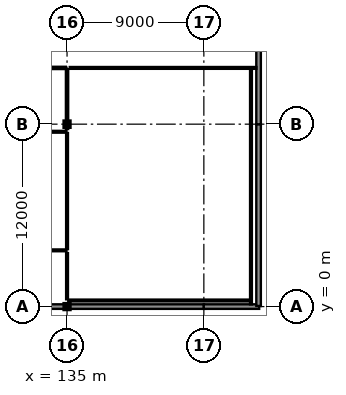
"""IFC4 building model, lengths in metres.
Left out: names, types, materials, properties, quantities, classifications, styles, units other than length and angle.
Written with IfcOpenShell. Run it as: python <this file> out.ifc"""

import sys

from ifc_helpers import new_model, si_unit, direction, frame, frame_2d, origin, origin_2d, place, context, subcontext, project, spatial, rectangle, i_section, extrude, element, fill, save


model = new_model("IFC4")
c1 = context("Model", 3, precision=1e-05, world=origin(), true_north=direction((0.0, 1.0)))
c2 = subcontext(c1, "Body", "Model", "MODEL_VIEW")
j1 = project(units=[si_unit("LENGTHUNIT", "METRE"), si_unit("PLANEANGLEUNIT", "RADIAN")], contexts=[c1])
p1 = place(None, origin())
s1 = spatial("IfcSite", under=j1, at=p1, CompositionType="ELEMENT")
p2 = place(p1, origin())
s2 = spatial("IfcBuilding", under=s1, at=p2, CompositionType="ELEMENT")
p3 = place(p2, frame((0.0, 0.0, 14.4)))
s3 = spatial("IfcBuildingStorey", under=s2, at=p3, CompositionType="ELEMENT", Elevation=14.4)
p4 = place(p3, frame((135.0, 0.0, 0.0), z_axis=(0.0, 0.0, 1.0), x_axis=(0.0, 1.0, 0.0)))
e1 = element("IfcColumn", 1, at=p4, inside=s3, PredefinedType="COLUMN", context=c2, shape_type="SweptSolid", body=[
    extrude(i_section(OverallWidth=0.3, OverallDepth=0.3, WebThickness=0.011, FlangeThickness=0.019, at=origin_2d()), origin(), (0.0, 0.0, 1.0), 4.5),
])
p5 = place(p3, frame((135.0, 12.0, 0.0), z_axis=(0.0, 0.0, 1.0), x_axis=(1.0, 0.0, 0.0)))
e2 = element("IfcColumn", 2, at=p5, inside=s3, PredefinedType="COLUMN", context=c2, shape_type="SweptSolid", body=[
    extrude(i_section(OverallWidth=0.3, OverallDepth=0.32, WebThickness=0.011, FlangeThickness=0.021, at=origin_2d()), origin(), (0.0, 0.0, 1.0), 4.5),
])
p6 = place(p3, frame((126.008, 0.0, 0.0), z_axis=(0.0, 0.0, 1.0), x_axis=(1.0, 0.0, 0.0)))
e3 = element("IfcWall", 3, at=p6, inside=s3, PredefinedType="SOLIDWALL", context=c2, shape_type="SweptSolid", body=[
    extrude(rectangle(XDim=8.844, YDim=0.3, at=frame_2d((4.422, 0.0))), origin(), (0.0, 0.0, 1.0), 3.167),
])
p7 = place(p6, frame((2.003, 0.0, 0.9)))
e4 = element("IfcOpeningElement", 4, at=p7, cuts=e3, PredefinedType="OPENING", context=c2, shape_type="SweptSolid", body=[
    extrude(rectangle(XDim=1.3, YDim=1.3, at=frame_2d((0.65, 0.65))), frame((0.0, 0.165, 0.0), z_axis=(0.0, -1.0, 0.0), x_axis=(1.0, 0.0, 0.0)), (0.0, 0.0, 1.0), 0.33),
])
p8 = place(p6, frame((5.541, 0.0, 0.9)))
e5 = element("IfcOpeningElement", 5, at=p8, cuts=e3, PredefinedType="OPENING", context=c2, shape_type="SweptSolid", body=[
    extrude(rectangle(XDim=1.3, YDim=1.3, at=frame_2d((0.65, 0.65))), frame((0.0, 0.165, 0.0), z_axis=(0.0, -1.0, 0.0), x_axis=(1.0, 0.0, 0.0)), (0.0, 0.0, 1.0), 0.33),
])
p9 = place(p3, frame((135.148, 0.0, 0.0), z_axis=(0.0, 0.0, 1.0), x_axis=(1.0, 0.0, 0.0)))
e6 = element("IfcWall", 6, at=p9, inside=s3, PredefinedType="SOLIDWALL", context=c2, shape_type="SweptSolid", body=[
    extrude(rectangle(XDim=8.862, YDim=0.3, at=frame_2d((4.431, 0.0))), origin(), (0.0, 0.0, 1.0), 3.167),
])
p10 = place(p3, frame((143.99, 0.0, 0.0), z_axis=(0.0, 0.0, 1.0), x_axis=(1.0, 0.0, 0.0)))
e7 = element("IfcWall", 7, at=p10, inside=s3, PredefinedType="SOLIDWALL", context=c2, shape_type="SweptSolid", body=[
    extrude(rectangle(XDim=3.65, YDim=0.3, at=frame_2d((1.825, 0.0))), origin(), (0.0, 0.0, 1.0), 3.167),
])
p11 = place(p3, frame((147.6, 0.04, 0.0), z_axis=(0.0, 0.0, 1.0), x_axis=(0.0, 1.0, 0.0)))
e8 = element("IfcWall", 8, at=p11, inside=s3, PredefinedType="SOLIDWALL", context=c2, shape_type="SweptSolid", body=[
    extrude(rectangle(XDim=11.97, YDim=0.3, at=frame_2d((5.985, 0.0))), origin(), (0.0, 0.0, 1.0), 3.475),
])
p12 = place(p11, frame((2.352, 0.0, 0.85)))
e9 = element("IfcOpeningElement", 9, at=p12, cuts=e8, PredefinedType="OPENING", context=c2, shape_type="SweptSolid", body=[
    extrude(rectangle(XDim=2.0, YDim=2.0, at=frame_2d((1.0, 1.0))), frame((0.0, 0.165, 0.0), z_axis=(0.0, -1.0, 0.0), x_axis=(1.0, 0.0, 0.0)), (0.0, 0.0, 1.0), 0.33),
])
p13 = place(p11, frame((7.618, 0.0, 0.85)))
e10 = element("IfcOpeningElement", 10, at=p13, cuts=e8, PredefinedType="OPENING", context=c2, shape_type="SweptSolid", body=[
    extrude(rectangle(XDim=2.0, YDim=2.0, at=frame_2d((1.0, 1.0))), frame((0.0, 0.165, 0.0), z_axis=(0.0, -1.0, 0.0), x_axis=(1.0, 0.0, 0.0)), (0.0, 0.0, 1.0), 0.33),
])
p14 = place(p3, frame((147.6, 11.99, 0.0), z_axis=(0.0, 0.0, 1.0), x_axis=(0.0, 1.0, 0.0)))
e11 = element("IfcWall", 11, at=p14, inside=s3, PredefinedType="SOLIDWALL", context=c2, shape_type="SweptSolid", body=[
    extrude(rectangle(XDim=12.05, YDim=0.3, at=frame_2d((6.025, 0.0))), origin(), (0.0, 0.0, 1.0), 3.475),
])
p15 = place(p14, frame((1.47, 0.0, 0.85)))
e12 = element("IfcOpeningElement", 12, at=p15, cuts=e11, PredefinedType="OPENING", context=c2, shape_type="SweptSolid", body=[
    extrude(rectangle(XDim=2.0, YDim=2.0, at=frame_2d((1.0, 1.0))), frame((0.0, 0.165, 0.0), z_axis=(0.0, -1.0, 0.0), x_axis=(1.0, 0.0, 0.0)), (0.0, 0.0, 1.0), 0.33),
])
p16 = place(p14, frame((7.676, 0.0, 0.85)))
e13 = element("IfcOpeningElement", 13, at=p16, cuts=e11, PredefinedType="OPENING", context=c2, shape_type="SweptSolid", body=[
    extrude(rectangle(XDim=2.0, YDim=2.0, at=frame_2d((1.0, 1.0))), frame((0.0, 0.165, 0.0), z_axis=(0.0, -1.0, 0.0), x_axis=(1.0, 0.0, 0.0)), (0.0, 0.0, 1.0), 0.33),
])
p17 = place(p3, frame((130.18, 11.5, 0.0), z_axis=(0.0, 0.0, 1.0), x_axis=(1.0, 0.0, 0.0)))
e14 = element("IfcWall", 14, at=p17, inside=s3, PredefinedType="PARTITIONING", context=c2, shape_type="SweptSolid", body=[
    extrude(rectangle(XDim=4.74, YDim=0.12, at=frame_2d((2.37, 0.0))), origin(), (0.0, 0.0, 1.0), 4.14),
])
p18 = place(p3, frame((135.0, 11.42, 0.0), z_axis=(0.0, 0.0, 1.0), x_axis=(0.0, -1.0, 0.0)))
e15 = element("IfcWall", 15, at=p18, inside=s3, PredefinedType="PARTITIONING", context=c2, shape_type="SweptSolid", body=[
    extrude(rectangle(XDim=7.64, YDim=0.12, at=frame_2d((3.82, 0.0))), origin(), (0.0, 0.0, 1.0), 3.785),
])
p19 = place(p3, frame((134.92, 3.7, 0.0), z_axis=(0.0, 0.0, 1.0), x_axis=(-1.0, 0.0, 0.0)))
e16 = element("IfcWall", 16, at=p19, inside=s3, PredefinedType="PARTITIONING", context=c2, shape_type="SweptSolid", body=[
    extrude(rectangle(XDim=17.64, YDim=0.12, at=frame_2d((8.82, 0.0))), origin(), (0.0, 0.0, 1.0), 4.14),
])
p20 = place(p3, frame((130.18, 15.7, 0.0), z_axis=(0.0, 0.0, 1.0), x_axis=(1.0, 0.0, 0.0)))
e17 = element("IfcWall", 17, at=p20, inside=s3, PredefinedType="PARTITIONING", context=c2, shape_type="SweptSolid", body=[
    extrude(rectangle(XDim=4.74, YDim=0.15, at=frame_2d((2.37, 0.0))), origin(), (0.0, 0.0, 1.0), 4.14),
])
p21 = place(p20, frame((1.845, 0.0, 0.0)))
e18 = element("IfcOpeningElement", 18, at=p21, cuts=e17, PredefinedType="OPENING", context=c2, shape_type="SweptSolid", body=[
    extrude(rectangle(XDim=1.05, YDim=2.25, at=frame_2d((0.525, 1.125))), frame((0.0, 0.09, 0.0), z_axis=(0.0, -1.0, 0.0), x_axis=(1.0, 0.0, 0.0)), (0.0, 0.0, 1.0), 0.18),
])
p22 = place(p3, frame((135.0, 15.62, 0.0), z_axis=(0.0, 0.0, 1.0), x_axis=(0.0, -1.0, 0.0)))
e19 = element("IfcWall", 19, at=p22, inside=s3, PredefinedType="PARTITIONING", context=c2, shape_type="SweptSolid", body=[
    extrude(rectangle(XDim=3.94, YDim=0.15, at=frame_2d((1.97, 0.0))), origin(), (0.0, 0.0, 1.0), 3.785),
])
p23 = place(p3, frame((135.18, 15.7, 0.0), z_axis=(0.0, 0.0, 1.0), x_axis=(1.0, 0.0, 0.0)))
e20 = element("IfcWall", 20, at=p23, inside=s3, PredefinedType="PARTITIONING", context=c2, shape_type="SweptSolid", body=[
    extrude(rectangle(XDim=12.275, YDim=0.12, at=frame_2d((6.138, 0.0))), origin(), (0.0, 0.0, 1.0), 4.14),
])
p24 = place(p23, frame((5.662, 0.0, 0.0)))
e21 = element("IfcOpeningElement", 21, at=p24, cuts=e20, PredefinedType="OPENING", context=c2, shape_type="SweptSolid", body=[
    extrude(rectangle(XDim=0.95, YDim=2.15, at=frame_2d((0.475, 1.075))), frame((0.0, 0.075, 0.0), z_axis=(0.0, -1.0, 0.0), x_axis=(1.0, 0.0, 0.0)), (0.0, 0.0, 1.0), 0.15),
])
p25 = place(p3, frame((147.1, 15.645, 0.0), z_axis=(0.0, 0.0, 1.0), x_axis=(0.0, -1.0, 0.0)))
e22 = element("IfcWall", 22, at=p25, inside=s3, PredefinedType="PARTITIONING", context=c2, shape_type="SweptSolid", body=[
    extrude(rectangle(XDim=15.5, YDim=0.12, at=frame_2d((7.75, 0.0))), origin(), (0.0, 0.0, 1.0), 4.14),
])
p26 = place(p3, frame((147.045, 0.4, 0.0), z_axis=(0.0, 0.0, 1.0), x_axis=(-1.0, 0.0, 0.0)))
e23 = element("IfcWall", 23, at=p26, inside=s3, PredefinedType="PARTITIONING", context=c2, shape_type="SweptSolid", body=[
    extrude(rectangle(XDim=11.965, YDim=0.12, at=frame_2d((5.982, 0.0))), origin(), (0.0, 0.0, 1.0), 4.14),
])
p27 = place(p3, frame((135.0, 0.48, 0.0), z_axis=(0.0, 0.0, 1.0), x_axis=(0.0, 1.0, 0.0)))
e24 = element("IfcWall", 24, at=p27, inside=s3, PredefinedType="PARTITIONING", context=c2, shape_type="SweptSolid", body=[
    extrude(rectangle(XDim=3.04, YDim=0.12, at=frame_2d((1.52, 0.0))), origin(), (0.0, 0.0, 1.0), 3.785),
])
p28 = place(p12, origin())
e25 = element("IfcWindow", 25, at=p28, inside=s3, PartitioningType="SINGLE_PANEL", PredefinedType="WINDOW", context=c2, shape_type="SweptSolid", body=[
    extrude(rectangle(XDim=2.0, YDim=2.0, at=frame_2d((1.0, 1.0))), frame((0.0, 0.03, 0.0), z_axis=(0.0, -1.0, 0.0), x_axis=(1.0, 0.0, 0.0)), (0.0, 0.0, 1.0), 0.06),
])
fill(e9, e25)
p29 = place(p13, origin())
e26 = element("IfcWindow", 26, at=p29, inside=s3, PartitioningType="SINGLE_PANEL", PredefinedType="WINDOW", context=c2, shape_type="SweptSolid", body=[
    extrude(rectangle(XDim=2.0, YDim=2.0, at=frame_2d((1.0, 1.0))), frame((0.0, 0.03, 0.0), z_axis=(0.0, -1.0, 0.0), x_axis=(1.0, 0.0, 0.0)), (0.0, 0.0, 1.0), 0.06),
])
fill(e10, e26)
p30 = place(p15, origin())
e27 = element("IfcWindow", 27, at=p30, inside=s3, PartitioningType="SINGLE_PANEL", PredefinedType="WINDOW", context=c2, shape_type="SweptSolid", body=[
    extrude(rectangle(XDim=2.0, YDim=2.0, at=frame_2d((1.0, 1.0))), frame((0.0, 0.03, 0.0), z_axis=(0.0, -1.0, 0.0), x_axis=(1.0, 0.0, 0.0)), (0.0, 0.0, 1.0), 0.06),
])
fill(e12, e27)
p31 = place(p24, origin())
e28 = element("IfcDoor", 28, at=p31, inside=s3, OperationType="SINGLE_SWING_RIGHT", PredefinedType="DOOR", context=c2, shape_type="SweptSolid", body=[
    extrude(rectangle(XDim=0.95, YDim=2.15, at=frame_2d((0.475, 1.075))), frame((0.0, 0.025, 0.0), z_axis=(0.0, -1.0, 0.0), x_axis=(1.0, 0.0, 0.0)), (0.0, 0.0, 1.0), 0.05),
])
fill(e21, e28)
save(model, sys.argv[1])
